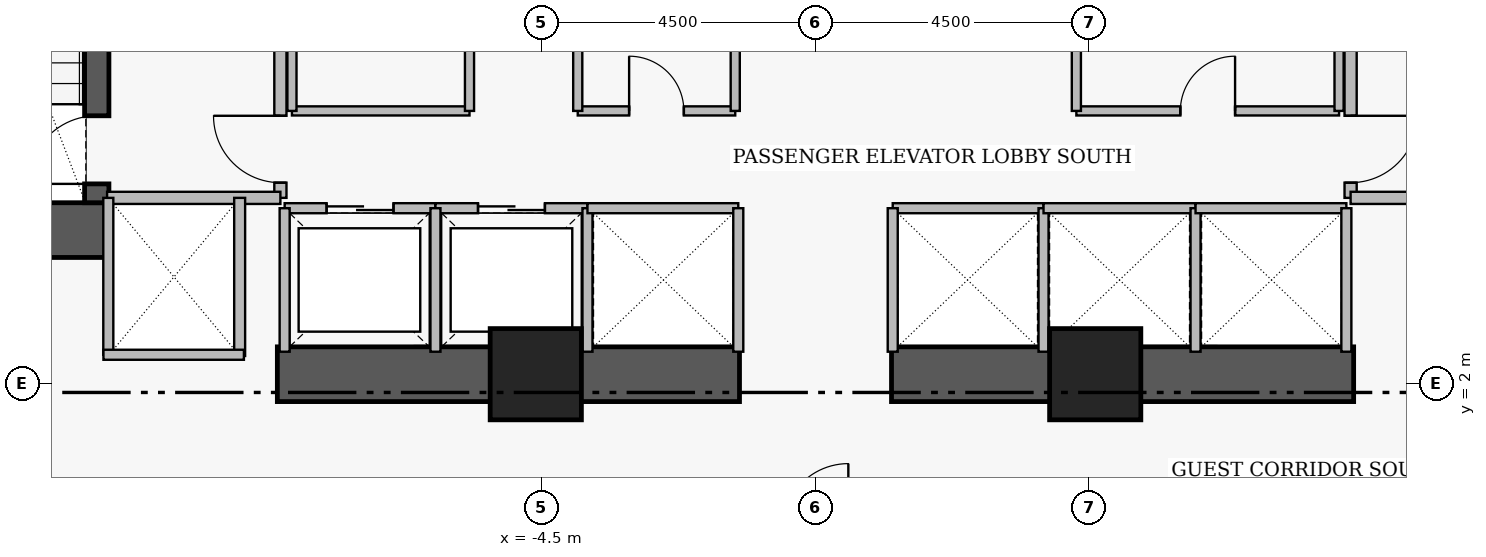
"""IFC4 building model, lengths in metres.
Left out: names, types, materials, properties, quantities, classifications, styles, units other than length and angle.
Written with IfcOpenShell. Run it as: python <this file> out.ifc"""

import sys

from ifc_helpers import new_model, si_unit, direction, frame, frame_2d, origin, origin_2d, place, context, subcontext, project, spatial, rectangle, extrude, element, fill, save


model = new_model("IFC4")
c1 = context("Model", 3, precision=1e-05, world=origin(), true_north=direction((0.0, 1.0)))
c2 = subcontext(c1, "Body", "Model", "MODEL_VIEW")
j1 = project(units=[si_unit("LENGTHUNIT", "METRE"), si_unit("PLANEANGLEUNIT", "RADIAN")], contexts=[c1])
p1 = place(None, origin())
s1 = spatial("IfcSite", under=j1, at=p1, CompositionType="ELEMENT")
p2 = place(p1, origin())
s2 = spatial("IfcBuilding", under=s1, at=p2, CompositionType="ELEMENT")
p3 = place(p2, frame((0.0, 0.0, 71.4)))
s3 = spatial("IfcBuildingStorey", under=s2, at=p3, CompositionType="ELEMENT", Elevation=71.4)
p4 = place(p3, frame((-16.31, 4.52, 0.0), z_axis=(0.0, 0.0, 1.0), x_axis=(1.0, 0.0, 0.0)))
e1 = element("IfcWall", 1, at=p4, inside=s3, PredefinedType="SHEAR", context=c2, shape_type="SweptSolid", body=[
    extrude(rectangle(XDim=4.71, YDim=0.9, at=frame_2d((2.355, 0.0))), origin(), (0.0, 0.0, 1.0), 3.46),
])
for number, where, z_axis, x_axis in (
    (2, (-8.85, 2.15, 0.0), (0.0, 0.0, 1.0), (1.0, 0.0, 0.0)),
    (3, (1.25, 2.15, 0.0), (0.0, 0.0, 1.0), (1.0, 0.0, 0.0)),
):
    element("IfcWall", number, at=place(p3, frame(where, z_axis=z_axis, x_axis=x_axis)), inside=s3, PredefinedType="SHEAR", context=c2, shape_type="SweptSolid", body=[
        extrude(rectangle(XDim=7.6, YDim=0.9, at=frame_2d((3.8, 0.0))), origin(), (0.0, 0.0, 1.0), 3.43),
    ])
p5 = place(p3, frame((-11.82, 4.97, 0.0), z_axis=(0.0, 0.0, 1.0), x_axis=(0.0, 1.0, 0.0)))
e4 = element("IfcWall", 4, at=p5, inside=s3, PredefinedType="SHEAR", context=c2, shape_type="SweptSolid", body=[
    extrude(rectangle(XDim=8.96, YDim=0.4, at=frame_2d((4.48, 0.0))), origin(), (0.0, 0.0, 1.0), 3.46),
])
p6 = place(p5, frame((0.31, 0.0, 0.0)))
e5 = element("IfcOpeningElement", 5, at=p6, cuts=e4, PredefinedType="OPENING", context=c2, shape_type="SweptSolid", body=[
    extrude(rectangle(XDim=1.12, YDim=2.22, at=frame_2d((0.56, 1.11))), frame((0.0, 0.21, 0.0), z_axis=(0.0, -1.0, 0.0), x_axis=(1.0, 0.0, 0.0)), (0.0, 0.0, 1.0), 0.42),
])
for number, where, z_axis, x_axis in (
    (6, (-4.6, 2.15, 0.0), (0.0, 0.0, 1.0), (1.0, 0.0, 0.0)),
    (7, (4.6, 2.15, 0.0), (0.0, 0.0, 1.0), (1.0, 0.0, 0.0)),
):
    element("IfcColumn", number, at=place(p3, frame(where, z_axis=z_axis, x_axis=x_axis)), inside=s3, PredefinedType="COLUMN", context=c2, shape_type="SweptSolid", body=[
        extrude(rectangle(XDim=1.5, YDim=1.5, at=origin_2d()), origin(), (0.0, 0.0, 1.0), 3.65),
    ])
p7 = place(p3, frame((-8.8, 5.05, 0.0), z_axis=(0.0, 0.0, 1.0), x_axis=(0.0, 1.0, 0.0)))
e8 = element("IfcWall", 8, at=p7, inside=s3, PredefinedType="PARTITIONING", context=c2, shape_type="SweptSolid", body=[
    extrude(rectangle(XDim=6.1, YDim=0.2, at=frame_2d((3.05, 0.0))), origin(), (0.0, 0.0, 1.0), 3.43),
])
p8 = place(p7, frame((0.25, 0.0, 0.0)))
e9 = element("IfcOpeningElement", 9, at=p8, cuts=e8, PredefinedType="OPENING", context=c2, shape_type="SweptSolid", body=[
    extrude(rectangle(XDim=1.1, YDim=2.2, at=frame_2d((0.55, 1.1))), frame((0.0, 0.11, 0.0), z_axis=(0.0, -1.0, 0.0), x_axis=(1.0, 0.0, 0.0)), (0.0, 0.0, 1.0), 0.22),
])
p9 = place(p7, frame((3.85, 0.0, 0.0)))
e10 = element("IfcOpeningElement", 10, at=p9, cuts=e8, PredefinedType="OPENING", context=c2, shape_type="SweptSolid", body=[
    extrude(rectangle(XDim=1.1, YDim=2.2, at=frame_2d((0.55, 1.1))), frame((0.0, 0.11, 0.0), z_axis=(0.0, -1.0, 0.0), x_axis=(1.0, 0.0, 0.0)), (0.0, 0.0, 1.0), 0.22),
])
p10 = place(p3, frame((8.8, 11.15, 0.0), z_axis=(0.0, 0.0, 1.0), x_axis=(0.0, -1.0, 0.0)))
e11 = element("IfcWall", 11, at=p10, inside=s3, PredefinedType="PARTITIONING", context=c2, shape_type="SweptSolid", body=[
    extrude(rectangle(XDim=6.1, YDim=0.2, at=frame_2d((3.05, 0.0))), origin(), (0.0, 0.0, 1.0), 3.43),
])
p11 = place(p10, frame((1.15, 0.0, 0.0)))
e12 = element("IfcOpeningElement", 12, at=p11, cuts=e11, PredefinedType="OPENING", context=c2, shape_type="SweptSolid", body=[
    extrude(rectangle(XDim=1.1, YDim=2.2, at=frame_2d((0.55, 1.1))), frame((0.0, 0.11, 0.0), z_axis=(0.0, -1.0, 0.0), x_axis=(1.0, 0.0, 0.0)), (0.0, 0.0, 1.0), 0.22),
])
p12 = place(p10, frame((4.75, 0.0, 0.0)))
e13 = element("IfcOpeningElement", 13, at=p12, cuts=e11, PredefinedType="OPENING", context=c2, shape_type="SweptSolid", body=[
    extrude(rectangle(XDim=1.1, YDim=2.2, at=frame_2d((0.55, 1.1))), frame((0.0, 0.11, 0.0), z_axis=(0.0, -1.0, 0.0), x_axis=(1.0, 0.0, 0.0)), (0.0, 0.0, 1.0), 0.22),
])
p13 = place(p3, frame((-8.73, 4.88, 0.0), z_axis=(0.0, 0.0, 1.0), x_axis=(1.0, 0.0, 0.0)))
e14 = element("IfcWall", 14, at=p13, inside=s3, PredefinedType="PARTITIONING", context=c2, shape_type="SweptSolid", body=[
    extrude(rectangle(XDim=2.48, YDim=0.165, at=frame_2d((1.24, 0.0))), origin(), (0.0, 0.0, 1.0), 3.43),
])
p14 = place(p13, frame((0.69, 0.0, 0.0)))
e15 = element("IfcOpeningElement", 15, at=p14, cuts=e14, PredefinedType="OPENING", context=c2, shape_type="SweptSolid", body=[
    extrude(rectangle(XDim=1.1, YDim=2.25, at=frame_2d((0.55, 1.125))), frame((0.0, 0.093, 0.0), z_axis=(0.0, -1.0, 0.0), x_axis=(1.0, 0.0, 0.0)), (0.0, 0.0, 1.0), 0.185),
])
p15 = place(p3, frame((-6.25, 4.88, 0.0), z_axis=(0.0, 0.0, 1.0), x_axis=(1.0, 0.0, 0.0)))
e16 = element("IfcWall", 16, at=p15, inside=s3, PredefinedType="PARTITIONING", context=c2, shape_type="SweptSolid", body=[
    extrude(rectangle(XDim=2.5, YDim=0.165, at=frame_2d((1.25, 0.0))), origin(), (0.0, 0.0, 1.0), 3.43),
])
p16 = place(p15, frame((0.7, 0.0, 0.0)))
e17 = element("IfcOpeningElement", 17, at=p16, cuts=e16, PredefinedType="OPENING", context=c2, shape_type="SweptSolid", body=[
    extrude(rectangle(XDim=1.1, YDim=2.25, at=frame_2d((0.55, 1.125))), frame((0.0, 0.093, 0.0), z_axis=(0.0, -1.0, 0.0), x_axis=(1.0, 0.0, 0.0)), (0.0, 0.0, 1.0), 0.185),
])
p17 = place(p3, frame((-3.91, 6.48, 0.0), z_axis=(0.0, 0.0, 1.0), x_axis=(1.0, 0.0, 0.0)))
e18 = element("IfcWall", 18, at=p17, inside=s3, PredefinedType="PARTITIONING", context=c2, shape_type="SweptSolid", body=[
    extrude(rectangle(XDim=2.59, YDim=0.15, at=frame_2d((1.295, 0.0))), origin(), (0.0, 0.0, 1.0), 3.43),
])
p18 = place(p17, frame((0.845, 0.0, 0.0)))
e19 = element("IfcOpeningElement", 19, at=p18, cuts=e18, PredefinedType="OPENING", context=c2, shape_type="SweptSolid", body=[
    extrude(rectangle(XDim=0.9, YDim=2.15, at=frame_2d((0.45, 1.075))), frame((0.0, 0.085, 0.0), z_axis=(0.0, -1.0, 0.0), x_axis=(1.0, 0.0, 0.0)), (0.0, 0.0, 1.0), 0.17),
])
p19 = place(p3, frame((4.29, 6.48, 0.0), z_axis=(0.0, 0.0, 1.0), x_axis=(1.0, 0.0, 0.0)))
e20 = element("IfcWall", 20, at=p19, inside=s3, PredefinedType="PARTITIONING", context=c2, shape_type="SweptSolid", body=[
    extrude(rectangle(XDim=4.32, YDim=0.15, at=frame_2d((2.16, 0.0))), origin(), (0.0, 0.0, 1.0), 3.43),
])
p20 = place(p19, frame((1.71, 0.0, 0.0)))
e21 = element("IfcOpeningElement", 21, at=p20, cuts=e20, PredefinedType="OPENING", context=c2, shape_type="SweptSolid", body=[
    extrude(rectangle(XDim=0.9, YDim=2.15, at=frame_2d((0.45, 1.075))), frame((0.0, 0.085, 0.0), z_axis=(0.0, -1.0, 0.0), x_axis=(1.0, 0.0, 0.0)), (0.0, 0.0, 1.0), 0.17),
])
for number, where, z_axis, x_axis in (
    (22, (-11.65, 5.05, 0.0), (0.0, 0.0, 1.0), (1.0, 0.0, 0.0)),
    (23, (8.8, 5.05, 0.0), (0.0, 0.0, 1.0), (1.0, 0.0, 0.0)),
):
    element("IfcWall", number, at=place(p3, frame(where, z_axis=z_axis, x_axis=x_axis)), inside=s3, PredefinedType="PARTITIONING", context=c2, shape_type="SweptSolid", body=[
        extrude(rectangle(XDim=2.85, YDim=0.2, at=frame_2d((1.425, 0.0))), origin(), (0.0, 0.0, 1.0), 3.43),
    ])
for number, where, z_axis, x_axis in (
    (24, (-8.73, 2.52, 0.0), (0.0, 0.0, 1.0), (0.0, 1.0, 0.0)),
    (25, (-6.25, 2.52, 0.0), (0.0, 0.0, 1.0), (0.0, 1.0, 0.0)),
    (26, (-3.75, 2.52, 0.0), (0.0, 0.0, 1.0), (0.0, 1.0, 0.0)),
):
    element("IfcWall", number, at=place(p3, frame(where, z_axis=z_axis, x_axis=x_axis)), inside=s3, PredefinedType="PARTITIONING", context=c2, shape_type="SweptSolid", body=[
        extrude(rectangle(XDim=2.36, YDim=0.165, at=frame_2d((1.18, 0.0))), origin(), (0.0, 0.0, 1.0), 3.43),
    ])
p21 = place(p3, frame((-3.75, 4.88, 0.0), z_axis=(0.0, 0.0, 1.0), x_axis=(1.0, 0.0, 0.0)))
e27 = element("IfcWall", 27, at=p21, inside=s3, PredefinedType="PARTITIONING", context=c2, shape_type="SweptSolid", body=[
    extrude(rectangle(XDim=2.48, YDim=0.165, at=frame_2d((1.24, 0.0))), origin(), (0.0, 0.0, 1.0), 3.43),
])
p22 = place(p3, frame((-1.27, 2.52, 0.0), z_axis=(0.0, 0.0, 1.0), x_axis=(0.0, 1.0, 0.0)))
e28 = element("IfcWall", 28, at=p22, inside=s3, PredefinedType="PARTITIONING", context=c2, shape_type="SweptSolid", body=[
    extrude(rectangle(XDim=2.36, YDim=0.165, at=frame_2d((1.18, 0.0))), origin(), (0.0, 0.0, 1.0), 3.43),
])
p23 = place(p3, frame((1.27, 4.88, 0.0), z_axis=(0.0, 0.0, 1.0), x_axis=(1.0, 0.0, 0.0)))
e29 = element("IfcWall", 29, at=p23, inside=s3, PredefinedType="PARTITIONING", context=c2, shape_type="SweptSolid", body=[
    extrude(rectangle(XDim=2.48, YDim=0.165, at=frame_2d((1.24, 0.0))), origin(), (0.0, 0.0, 1.0), 3.43),
])
for number, where, z_axis, x_axis in (
    (30, (1.27, 2.52, 0.0), (0.0, 0.0, 1.0), (0.0, 1.0, 0.0)),
    (31, (3.75, 2.52, 0.0), (0.0, 0.0, 1.0), (0.0, 1.0, 0.0)),
):
    element("IfcWall", number, at=place(p3, frame(where, z_axis=z_axis, x_axis=x_axis)), inside=s3, PredefinedType="PARTITIONING", context=c2, shape_type="SweptSolid", body=[
        extrude(rectangle(XDim=2.36, YDim=0.165, at=frame_2d((1.18, 0.0))), origin(), (0.0, 0.0, 1.0), 3.43),
    ])
p24 = place(p3, frame((3.75, 4.88, 0.0), z_axis=(0.0, 0.0, 1.0), x_axis=(1.0, 0.0, 0.0)))
e32 = element("IfcWall", 32, at=p24, inside=s3, PredefinedType="PARTITIONING", context=c2, shape_type="SweptSolid", body=[
    extrude(rectangle(XDim=2.5, YDim=0.165, at=frame_2d((1.25, 0.0))), origin(), (0.0, 0.0, 1.0), 3.43),
])
p25 = place(p3, frame((6.25, 2.52, 0.0), z_axis=(0.0, 0.0, 1.0), x_axis=(0.0, 1.0, 0.0)))
e33 = element("IfcWall", 33, at=p25, inside=s3, PredefinedType="PARTITIONING", context=c2, shape_type="SweptSolid", body=[
    extrude(rectangle(XDim=2.36, YDim=0.165, at=frame_2d((1.18, 0.0))), origin(), (0.0, 0.0, 1.0), 3.43),
])
p26 = place(p3, frame((6.25, 4.88, 0.0), z_axis=(0.0, 0.0, 1.0), x_axis=(1.0, 0.0, 0.0)))
e34 = element("IfcWall", 34, at=p26, inside=s3, PredefinedType="PARTITIONING", context=c2, shape_type="SweptSolid", body=[
    extrude(rectangle(XDim=2.48, YDim=0.165, at=frame_2d((1.24, 0.0))), origin(), (0.0, 0.0, 1.0), 3.43),
])
p27 = place(p3, frame((8.73, 2.52, 0.0), z_axis=(0.0, 0.0, 1.0), x_axis=(0.0, 1.0, 0.0)))
e35 = element("IfcWall", 35, at=p27, inside=s3, PredefinedType="PARTITIONING", context=c2, shape_type="SweptSolid", body=[
    extrude(rectangle(XDim=2.36, YDim=0.165, at=frame_2d((1.18, 0.0))), origin(), (0.0, 0.0, 1.0), 3.43),
])
p28 = place(p3, frame((-9.47, 2.45, 0.0), z_axis=(0.0, 0.0, 1.0), x_axis=(0.0, 1.0, 0.0)))
e36 = element("IfcWall", 36, at=p28, inside=s3, PredefinedType="PARTITIONING", context=c2, shape_type="SweptSolid", body=[
    extrude(rectangle(XDim=2.6, YDim=0.18, at=frame_2d((1.3, 0.0))), origin(), (0.0, 0.0, 1.0), 3.43),
])
p29 = place(p3, frame((-11.63, 2.47, 0.0), z_axis=(0.0, 0.0, 1.0), x_axis=(0.0, 1.0, 0.0)))
e37 = element("IfcWall", 37, at=p29, inside=s3, PredefinedType="PARTITIONING", context=c2, shape_type="SweptSolid", body=[
    extrude(rectangle(XDim=2.58, YDim=0.165, at=frame_2d((1.29, 0.0))), origin(), (0.0, 0.0, 1.0), 3.43),
])
p30 = place(p3, frame((-11.71, 2.47, 0.0), z_axis=(0.0, 0.0, 1.0), x_axis=(1.0, 0.0, 0.0)))
e38 = element("IfcWall", 38, at=p30, inside=s3, PredefinedType="PARTITIONING", context=c2, shape_type="SweptSolid", body=[
    extrude(rectangle(XDim=2.31, YDim=0.165, at=frame_2d((1.155, 0.0))), origin(), (0.0, 0.0, 1.0), 2.03),
])
p31 = place(p3, frame((-8.61, 6.48, 0.0), z_axis=(0.0, 0.0, 1.0), x_axis=(1.0, 0.0, 0.0)))
e39 = element("IfcWall", 39, at=p31, inside=s3, PredefinedType="PARTITIONING", context=c2, shape_type="SweptSolid", body=[
    extrude(rectangle(XDim=2.92, YDim=0.15, at=frame_2d((1.46, 0.0))), origin(), (0.0, 0.0, 1.0), 3.43),
])
for number, where, z_axis, x_axis in (
    (40, (-8.61, 6.48, 0.0), (0.0, 0.0, 1.0), (0.0, 1.0, 0.0)),
    (41, (-5.69, 6.48, 0.0), (0.0, 0.0, 1.0), (0.0, 1.0, 0.0)),
    (42, (-3.91, 6.48, 0.0), (0.0, 0.0, 1.0), (0.0, 1.0, 0.0)),
    (43, (-1.32, 6.48, 0.0), (0.0, 0.0, 1.0), (0.0, 1.0, 0.0)),
    (44, (4.29, 6.48, 0.0), (0.0, 0.0, 1.0), (0.0, 1.0, 0.0)),
    (45, (8.61, 6.48, 0.0), (0.0, 0.0, 1.0), (0.0, 1.0, 0.0)),
):
    element("IfcWall", number, at=place(p3, frame(where, z_axis=z_axis, x_axis=x_axis)), inside=s3, PredefinedType="PARTITIONING", context=c2, shape_type="SweptSolid", body=[
        extrude(rectangle(XDim=2.24, YDim=0.15, at=frame_2d((1.12, 0.0))), origin(), (0.0, 0.0, 1.0), 3.43),
    ])
p32 = place(p6, origin())
e46 = element("IfcDoor", 46, at=p32, inside=s3, OperationType="SINGLE_SWING_LEFT", PredefinedType="DOOR", context=c2, shape_type="SweptSolid", body=[
    extrude(rectangle(XDim=1.12, YDim=2.22, at=frame_2d((0.56, 1.11))), frame((0.0, 0.025, 0.0), z_axis=(0.0, -1.0, 0.0), x_axis=(1.0, 0.0, 0.0)), (0.0, 0.0, 1.0), 0.05),
])
fill(e5, e46)
p33 = place(p8, origin())
e47 = element("IfcDoor", 47, at=p33, inside=s3, OperationType="SINGLE_SWING_RIGHT", PredefinedType="DOOR", context=c2, shape_type="SweptSolid", body=[
    extrude(rectangle(XDim=1.1, YDim=2.2, at=frame_2d((0.55, 1.1))), frame((0.0, 0.025, 0.0), z_axis=(0.0, -1.0, 0.0), x_axis=(1.0, 0.0, 0.0)), (0.0, 0.0, 1.0), 0.05),
])
fill(e9, e47)
p34 = place(p12, origin())
e48 = element("IfcDoor", 48, at=p34, inside=s3, OperationType="SINGLE_SWING_LEFT", PredefinedType="DOOR", context=c2, shape_type="SweptSolid", body=[
    extrude(rectangle(XDim=1.1, YDim=2.2, at=frame_2d((0.55, 1.1))), frame((0.0, 0.025, 0.0), z_axis=(0.0, -1.0, 0.0), x_axis=(1.0, 0.0, 0.0)), (0.0, 0.0, 1.0), 0.05),
])
fill(e13, e48)
p35 = place(p14, origin())
e49 = element("IfcDoor", 49, at=p35, inside=s3, OperationType="SLIDING_TO_LEFT", PredefinedType="DOOR", context=c2, shape_type="SweptSolid", body=[
    extrude(rectangle(XDim=1.1, YDim=2.25, at=frame_2d((0.55, 1.125))), frame((0.0, 0.025, 0.0), z_axis=(0.0, -1.0, 0.0), x_axis=(1.0, 0.0, 0.0)), (0.0, 0.0, 1.0), 0.05),
])
fill(e15, e49)
p36 = place(p16, origin())
e50 = element("IfcDoor", 50, at=p36, inside=s3, OperationType="SLIDING_TO_LEFT", PredefinedType="DOOR", context=c2, shape_type="SweptSolid", body=[
    extrude(rectangle(XDim=1.1, YDim=2.25, at=frame_2d((0.55, 1.125))), frame((0.0, 0.025, 0.0), z_axis=(0.0, -1.0, 0.0), x_axis=(1.0, 0.0, 0.0)), (0.0, 0.0, 1.0), 0.05),
])
fill(e17, e50)
p37 = place(p18, origin())
e51 = element("IfcDoor", 51, at=p37, inside=s3, OperationType="SINGLE_SWING_LEFT", PredefinedType="DOOR", context=c2, shape_type="SweptSolid", body=[
    extrude(rectangle(XDim=0.9, YDim=2.15, at=frame_2d((0.45, 1.075))), frame((0.0, 0.025, 0.0), z_axis=(0.0, -1.0, 0.0), x_axis=(1.0, 0.0, 0.0)), (0.0, 0.0, 1.0), 0.05),
])
fill(e19, e51)
p38 = place(p20, origin())
e52 = element("IfcDoor", 52, at=p38, inside=s3, OperationType="SINGLE_SWING_RIGHT", PredefinedType="DOOR", context=c2, shape_type="SweptSolid", body=[
    extrude(rectangle(XDim=0.9, YDim=2.15, at=frame_2d((0.45, 1.075))), frame((0.0, 0.025, 0.0), z_axis=(0.0, -1.0, 0.0), x_axis=(1.0, 0.0, 0.0)), (0.0, 0.0, 1.0), 0.05),
])
fill(e21, e52)
save(model, sys.argv[1])
